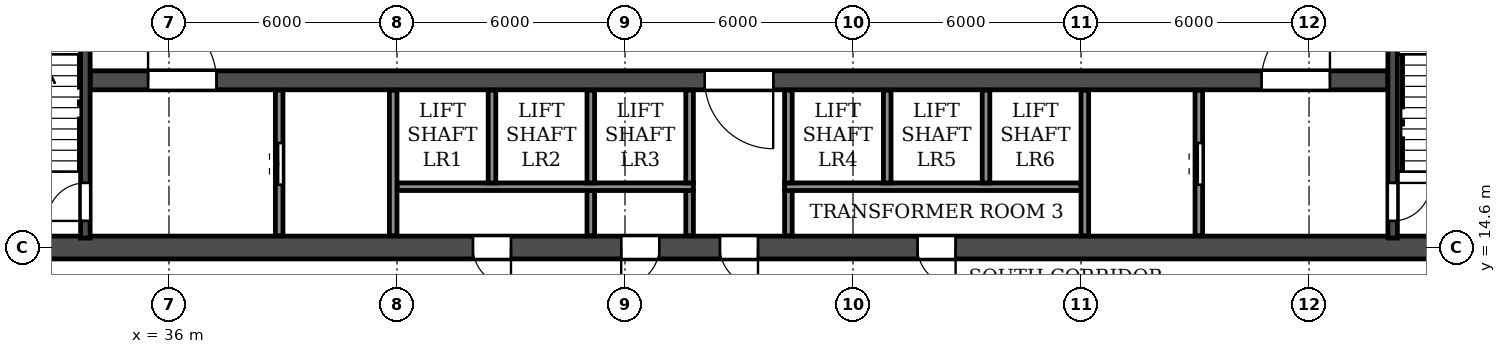
"""IFC4 building model, lengths in metres.
Left out: names, types, materials, properties, quantities, classifications, styles, units other than length and angle.
Written with IfcOpenShell. Run it as: python <this file> out.ifc"""

import sys

from ifc_helpers import new_model, si_unit, direction, frame, frame_2d, origin, place, context, subcontext, project, spatial, rectangle, extrude, element, fill, save


model = new_model("IFC4")
c1 = context("Model", 3, precision=1e-05, world=origin(), true_north=direction((0.0, 1.0)))
c2 = subcontext(c1, "Body", "Model", "MODEL_VIEW")
j1 = project(units=[si_unit("LENGTHUNIT", "METRE"), si_unit("PLANEANGLEUNIT", "RADIAN")], contexts=[c1])
p1 = place(None, origin())
s1 = spatial("IfcSite", under=j1, at=p1, CompositionType="ELEMENT")
p2 = place(p1, origin())
s2 = spatial("IfcBuilding", under=s1, at=p2, CompositionType="ELEMENT")
p3 = place(p2, frame((0.0, 0.0, 115.8)))
s3 = spatial("IfcBuildingStorey", under=s2, at=p3, CompositionType="ELEMENT", Elevation=115.8)
p4 = place(p3, frame((29.7, 14.6, 0.0), z_axis=(0.0, 0.0, 1.0), x_axis=(1.0, 0.0, 0.0)))
e1 = element("IfcWall", 1, at=p4, inside=s3, PredefinedType="SOLIDWALL", context=c2, shape_type="SweptSolid", body=[
    extrude(rectangle(XDim=42.6, YDim=0.6, at=frame_2d((21.3, 0.0))), origin(), (0.0, 0.0, 1.0), 6.37),
])
p5 = place(p4, frame((1.7, 0.0, 0.0)))
e2 = element("IfcOpeningElement", 2, at=p5, cuts=e1, PredefinedType="OPENING", context=c2, shape_type="SweptSolid", body=[
    extrude(rectangle(XDim=1.0, YDim=2.1, at=frame_2d((0.5, 1.05))), frame((0.0, 0.31, 0.0), z_axis=(0.0, -1.0, 0.0), x_axis=(1.0, 0.0, 0.0)), (0.0, 0.0, 1.0), 0.62),
])
p6 = place(p4, frame((14.3, 0.0, 0.0)))
e3 = element("IfcOpeningElement", 3, at=p6, cuts=e1, PredefinedType="OPENING", context=c2, shape_type="SweptSolid", body=[
    extrude(rectangle(XDim=1.0, YDim=2.1, at=frame_2d((0.5, 1.05))), frame((0.0, 0.31, 0.0), z_axis=(0.0, -1.0, 0.0), x_axis=(1.0, 0.0, 0.0)), (0.0, 0.0, 1.0), 0.62),
])
p7 = place(p4, frame((18.2, 0.0, 0.0)))
e4 = element("IfcOpeningElement", 4, at=p7, cuts=e1, PredefinedType="OPENING", context=c2, shape_type="SweptSolid", body=[
    extrude(rectangle(XDim=1.0, YDim=2.1, at=frame_2d((0.5, 1.05))), frame((0.0, 0.31, 0.0), z_axis=(0.0, -1.0, 0.0), x_axis=(1.0, 0.0, 0.0)), (0.0, 0.0, 1.0), 0.62),
])
p8 = place(p4, frame((20.8, 0.0, 0.0)))
e5 = element("IfcOpeningElement", 5, at=p8, cuts=e1, PredefinedType="OPENING", context=c2, shape_type="SweptSolid", body=[
    extrude(rectangle(XDim=1.0, YDim=2.1, at=frame_2d((0.5, 1.05))), frame((0.0, 0.31, 0.0), z_axis=(0.0, -1.0, 0.0), x_axis=(1.0, 0.0, 0.0)), (0.0, 0.0, 1.0), 0.62),
])
p9 = place(p4, frame((26.0, 0.0, 0.0)))
e6 = element("IfcOpeningElement", 6, at=p9, cuts=e1, PredefinedType="OPENING", context=c2, shape_type="SweptSolid", body=[
    extrude(rectangle(XDim=1.0, YDim=2.1, at=frame_2d((0.5, 1.05))), frame((0.0, 0.31, 0.0), z_axis=(0.0, -1.0, 0.0), x_axis=(1.0, 0.0, 0.0)), (0.0, 0.0, 1.0), 0.62),
])
p10 = place(p4, frame((39.9, 0.0, 0.0)))
e7 = element("IfcOpeningElement", 7, at=p10, cuts=e1, PredefinedType="OPENING", context=c2, shape_type="SweptSolid", body=[
    extrude(rectangle(XDim=1.0, YDim=2.1, at=frame_2d((0.5, 1.05))), frame((0.0, 0.31, 0.0), z_axis=(0.0, -1.0, 0.0), x_axis=(1.0, 0.0, 0.0)), (0.0, 0.0, 1.0), 0.62),
])
p11 = place(p3, frame((33.925, 19.0, 0.0), z_axis=(0.0, 0.0, 1.0), x_axis=(1.0, 0.0, 0.0)))
e8 = element("IfcWall", 8, at=p11, inside=s3, PredefinedType="SOLIDWALL", context=c2, shape_type="SweptSolid", body=[
    extrude(rectangle(XDim=34.15, YDim=0.5, at=frame_2d((17.075, 0.0))), origin(), (0.0, 0.0, 1.0), 6.37),
])
p12 = place(p11, frame((16.175, 0.0, 0.0)))
e9 = element("IfcOpeningElement", 9, at=p12, cuts=e8, PredefinedType="OPENING", context=c2, shape_type="SweptSolid", body=[
    extrude(rectangle(XDim=1.8, YDim=2.1, at=frame_2d((0.9, 1.05))), frame((0.0, 0.26, 0.0), z_axis=(0.0, -1.0, 0.0), x_axis=(1.0, 0.0, 0.0)), (0.0, 0.0, 1.0), 0.52),
])
p13 = place(p11, frame((1.525, 0.0, 0.0)))
e10 = element("IfcOpeningElement", 10, at=p13, cuts=e8, PredefinedType="OPENING", context=c2, shape_type="SweptSolid", body=[
    extrude(rectangle(XDim=1.8, YDim=2.1, at=frame_2d((0.9, 1.05))), frame((0.0, 0.26, 0.0), z_axis=(0.0, -1.0, 0.0), x_axis=(1.0, 0.0, 0.0)), (0.0, 0.0, 1.0), 0.52),
])
p14 = place(p11, frame((30.825, 0.0, 0.0)))
e11 = element("IfcOpeningElement", 11, at=p14, cuts=e8, PredefinedType="OPENING", context=c2, shape_type="SweptSolid", body=[
    extrude(rectangle(XDim=1.8, YDim=2.1, at=frame_2d((0.9, 1.05))), frame((0.0, 0.26, 0.0), z_axis=(0.0, -1.0, 0.0), x_axis=(1.0, 0.0, 0.0)), (0.0, 0.0, 1.0), 0.52),
])
p15 = place(p3, frame((33.8, 14.85, 0.0), z_axis=(0.0, 0.0, 1.0), x_axis=(0.0, 1.0, 0.0)))
e12 = element("IfcWall", 12, at=p15, inside=s3, PredefinedType="SOLIDWALL", context=c2, shape_type="SweptSolid", body=[
    extrude(rectangle(XDim=7.625, YDim=0.25, at=frame_2d((3.812, 0.0))), origin(), (0.0, 0.0, 1.0), 6.37),
])
p16 = place(p15, frame((0.45, 0.0, 0.0)))
e13 = element("IfcOpeningElement", 13, at=p16, cuts=e12, PredefinedType="OPENING", context=c2, shape_type="SweptSolid", body=[
    extrude(rectangle(XDim=1.0, YDim=2.1, at=frame_2d((0.5, 1.05))), frame((0.0, 0.135, 0.0), z_axis=(0.0, -1.0, 0.0), x_axis=(1.0, 0.0, 0.0)), (0.0, 0.0, 1.0), 0.27),
])
p17 = place(p3, frame((68.2, 14.85, 0.0), z_axis=(0.0, 0.0, 1.0), x_axis=(0.0, 1.0, 0.0)))
e14 = element("IfcWall", 14, at=p17, inside=s3, PredefinedType="SOLIDWALL", context=c2, shape_type="SweptSolid", body=[
    extrude(rectangle(XDim=7.625, YDim=0.25, at=frame_2d((3.812, 0.0))), origin(), (0.0, 0.0, 1.0), 6.37),
])
p18 = place(p17, frame((0.45, 0.0, 0.0)))
e15 = element("IfcOpeningElement", 15, at=p18, cuts=e14, PredefinedType="OPENING", context=c2, shape_type="SweptSolid", body=[
    extrude(rectangle(XDim=1.0, YDim=2.1, at=frame_2d((0.5, 1.05))), frame((0.0, 0.135, 0.0), z_axis=(0.0, -1.0, 0.0), x_axis=(1.0, 0.0, 0.0)), (0.0, 0.0, 1.0), 0.27),
])
for number, where, z_axis, x_axis in (
    (16, (47.1, 14.91, 0.0), (0.0, 0.0, 1.0), (0.0, 1.0, 0.0)),
    (17, (49.7, 14.91, 0.0), (0.0, 0.0, 1.0), (0.0, 1.0, 0.0)),
    (18, (52.3, 14.91, 0.0), (0.0, 0.0, 1.0), (0.0, 1.0, 0.0)),
):
    element("IfcWall", number, at=place(p3, frame(where, z_axis=z_axis, x_axis=x_axis)), inside=s3, PredefinedType="PARTITIONING", context=c2, shape_type="SweptSolid", body=[
        extrude(rectangle(XDim=1.19, YDim=0.2, at=frame_2d((0.595, 0.0))), origin(), (0.0, 0.0, 1.0), 6.37),
    ])
for number, where, z_axis, x_axis in (
    (19, (42.0, 16.2, 0.0), (0.0, 0.0, 1.0), (1.0, 0.0, 0.0)),
    (20, (52.2, 16.2, 0.0), (0.0, 0.0, 1.0), (1.0, 0.0, 0.0)),
):
    element("IfcWall", number, at=place(p3, frame(where, z_axis=z_axis, x_axis=x_axis)), inside=s3, PredefinedType="PARTITIONING", context=c2, shape_type="SweptSolid", body=[
        extrude(rectangle(XDim=7.8, YDim=0.2, at=frame_2d((3.9, 0.0))), origin(), (0.0, 0.0, 1.0), 6.37),
    ])
p19 = place(p3, frame((38.9, 14.91, 0.0), z_axis=(0.0, 0.0, 1.0), x_axis=(0.0, 1.0, 0.0)))
e21 = element("IfcWall", 21, at=p19, inside=s3, PredefinedType="PARTITIONING", context=c2, shape_type="SweptSolid", body=[
    extrude(rectangle(XDim=3.83, YDim=0.2, at=frame_2d((1.915, 0.0))), origin(), (0.0, 0.0, 1.0), 6.37),
])
p20 = place(p19, frame((1.34, 0.0, 0.0)))
e22 = element("IfcOpeningElement", 22, at=p20, cuts=e21, PredefinedType="OPENING", context=c2, shape_type="SweptSolid", body=[
    extrude(rectangle(XDim=1.1, YDim=2.1, at=frame_2d((0.55, 1.05))), frame((0.0, 0.11, 0.0), z_axis=(0.0, -1.0, 0.0), x_axis=(1.0, 0.0, 0.0)), (0.0, 0.0, 1.0), 0.22),
])
p21 = place(p3, frame((41.9, 14.91, 0.0), z_axis=(0.0, 0.0, 1.0), x_axis=(0.0, 1.0, 0.0)))
e23 = element("IfcWall", 23, at=p21, inside=s3, PredefinedType="PARTITIONING", context=c2, shape_type="SweptSolid", body=[
    extrude(rectangle(XDim=3.83, YDim=0.2, at=frame_2d((1.915, 0.0))), origin(), (0.0, 0.0, 1.0), 6.37),
])
for number, where, z_axis, x_axis in (
    (24, (44.5, 16.3, 0.0), (0.0, 0.0, 1.0), (0.0, 1.0, 0.0)),
    (25, (47.1, 16.3, 0.0), (0.0, 0.0, 1.0), (0.0, 1.0, 0.0)),
    (26, (49.7, 16.3, 0.0), (0.0, 0.0, 1.0), (0.0, 1.0, 0.0)),
    (27, (52.3, 16.3, 0.0), (0.0, 0.0, 1.0), (0.0, 1.0, 0.0)),
    (28, (54.9, 16.3, 0.0), (0.0, 0.0, 1.0), (0.0, 1.0, 0.0)),
    (29, (57.5, 16.3, 0.0), (0.0, 0.0, 1.0), (0.0, 1.0, 0.0)),
):
    element("IfcWall", number, at=place(p3, frame(where, z_axis=z_axis, x_axis=x_axis)), inside=s3, PredefinedType="PARTITIONING", context=c2, shape_type="SweptSolid", body=[
        extrude(rectangle(XDim=2.44, YDim=0.2, at=frame_2d((1.22, 0.0))), origin(), (0.0, 0.0, 1.0), 6.37),
    ])
p22 = place(p3, frame((60.1, 14.91, 0.0), z_axis=(0.0, 0.0, 1.0), x_axis=(0.0, 1.0, 0.0)))
e30 = element("IfcWall", 30, at=p22, inside=s3, PredefinedType="PARTITIONING", context=c2, shape_type="SweptSolid", body=[
    extrude(rectangle(XDim=3.83, YDim=0.2, at=frame_2d((1.915, 0.0))), origin(), (0.0, 0.0, 1.0), 6.37),
])
p23 = place(p3, frame((63.1, 14.91, 0.0), z_axis=(0.0, 0.0, 1.0), x_axis=(0.0, 1.0, 0.0)))
e31 = element("IfcWall", 31, at=p23, inside=s3, PredefinedType="PARTITIONING", context=c2, shape_type="SweptSolid", body=[
    extrude(rectangle(XDim=3.83, YDim=0.2, at=frame_2d((1.915, 0.0))), origin(), (0.0, 0.0, 1.0), 6.37),
])
p24 = place(p23, frame((1.34, 0.0, 0.0)))
e32 = element("IfcOpeningElement", 32, at=p24, cuts=e31, PredefinedType="OPENING", context=c2, shape_type="SweptSolid", body=[
    extrude(rectangle(XDim=1.1, YDim=2.1, at=frame_2d((0.55, 1.05))), frame((0.0, 0.11, 0.0), z_axis=(0.0, -1.0, 0.0), x_axis=(1.0, 0.0, 0.0)), (0.0, 0.0, 1.0), 0.22),
])
p25 = place(p6, frame((1.0, 0.0, 0.0), z_axis=(0.0, 0.0, 1.0), x_axis=(-1.0, 0.0, 0.0)))
e33 = element("IfcDoor", 33, at=p25, inside=s3, OperationType="SINGLE_SWING_LEFT", PredefinedType="DOOR", context=c2, shape_type="SweptSolid", body=[
    extrude(rectangle(XDim=1.0, YDim=2.1, at=frame_2d((0.5, 1.05))), frame((0.0, 0.025, 0.0), z_axis=(0.0, -1.0, 0.0), x_axis=(1.0, 0.0, 0.0)), (0.0, 0.0, 1.0), 0.05),
])
fill(e3, e33)
p26 = place(p7, frame((1.0, 0.0, 0.0), z_axis=(0.0, 0.0, 1.0), x_axis=(-1.0, 0.0, 0.0)))
e34 = element("IfcDoor", 34, at=p26, inside=s3, OperationType="SINGLE_SWING_RIGHT", PredefinedType="DOOR", context=c2, shape_type="SweptSolid", body=[
    extrude(rectangle(XDim=1.0, YDim=2.1, at=frame_2d((0.5, 1.05))), frame((0.0, 0.025, 0.0), z_axis=(0.0, -1.0, 0.0), x_axis=(1.0, 0.0, 0.0)), (0.0, 0.0, 1.0), 0.05),
])
fill(e4, e34)
p27 = place(p8, frame((1.0, 0.0, 0.0), z_axis=(0.0, 0.0, 1.0), x_axis=(-1.0, 0.0, 0.0)))
e35 = element("IfcDoor", 35, at=p27, inside=s3, OperationType="SINGLE_SWING_LEFT", PredefinedType="DOOR", context=c2, shape_type="SweptSolid", body=[
    extrude(rectangle(XDim=1.0, YDim=2.1, at=frame_2d((0.5, 1.05))), frame((0.0, 0.025, 0.0), z_axis=(0.0, -1.0, 0.0), x_axis=(1.0, 0.0, 0.0)), (0.0, 0.0, 1.0), 0.05),
])
fill(e5, e35)
p28 = place(p9, frame((1.0, 0.0, 0.0), z_axis=(0.0, 0.0, 1.0), x_axis=(-1.0, 0.0, 0.0)))
e36 = element("IfcDoor", 36, at=p28, inside=s3, OperationType="SINGLE_SWING_LEFT", PredefinedType="DOOR", context=c2, shape_type="SweptSolid", body=[
    extrude(rectangle(XDim=1.0, YDim=2.1, at=frame_2d((0.5, 1.05))), frame((0.0, 0.025, 0.0), z_axis=(0.0, -1.0, 0.0), x_axis=(1.0, 0.0, 0.0)), (0.0, 0.0, 1.0), 0.05),
])
fill(e6, e36)
p29 = place(p24, origin())
e37 = element("IfcDoor", 37, at=p29, inside=s3, OperationType="DOUBLE_DOOR_SLIDING", PredefinedType="DOOR", context=c2, shape_type="SweptSolid", body=[
    extrude(rectangle(XDim=1.1, YDim=2.1, at=frame_2d((0.55, 1.05))), frame((0.0, 0.025, 0.0), z_axis=(0.0, -1.0, 0.0), x_axis=(1.0, 0.0, 0.0)), (0.0, 0.0, 1.0), 0.05),
])
fill(e32, e37)
p30 = place(p18, frame((1.0, 0.0, 0.0), z_axis=(0.0, 0.0, 1.0), x_axis=(-1.0, 0.0, 0.0)))
e38 = element("IfcDoor", 38, at=p30, inside=s3, OperationType="SINGLE_SWING_LEFT", PredefinedType="DOOR", context=c2, shape_type="SweptSolid", body=[
    extrude(rectangle(XDim=1.0, YDim=2.1, at=frame_2d((0.5, 1.05))), frame((0.0, 0.025, 0.0), z_axis=(0.0, -1.0, 0.0), x_axis=(1.0, 0.0, 0.0)), (0.0, 0.0, 1.0), 0.05),
])
fill(e15, e38)
p31 = place(p16, origin())
e39 = element("IfcDoor", 39, at=p31, inside=s3, OperationType="SINGLE_SWING_LEFT", PredefinedType="DOOR", context=c2, shape_type="SweptSolid", body=[
    extrude(rectangle(XDim=1.0, YDim=2.1, at=frame_2d((0.5, 1.05))), frame((0.0, 0.025, 0.0), z_axis=(0.0, -1.0, 0.0), x_axis=(1.0, 0.0, 0.0)), (0.0, 0.0, 1.0), 0.05),
])
fill(e13, e39)
p32 = place(p20, origin())
e40 = element("IfcDoor", 40, at=p32, inside=s3, OperationType="DOUBLE_DOOR_SLIDING", PredefinedType="DOOR", context=c2, shape_type="SweptSolid", body=[
    extrude(rectangle(XDim=1.1, YDim=2.1, at=frame_2d((0.55, 1.05))), frame((0.0, 0.025, 0.0), z_axis=(0.0, -1.0, 0.0), x_axis=(1.0, 0.0, 0.0)), (0.0, 0.0, 1.0), 0.05),
])
fill(e22, e40)
p33 = place(p12, frame((1.8, 0.0, 0.0), z_axis=(0.0, 0.0, 1.0), x_axis=(-1.0, 0.0, 0.0)))
e41 = element("IfcDoor", 41, at=p33, inside=s3, OperationType="DOUBLE_DOOR_SINGLE_SWING", PredefinedType="DOOR", context=c2, shape_type="SweptSolid", body=[
    extrude(rectangle(XDim=1.8, YDim=2.1, at=frame_2d((0.9, 1.05))), frame((0.0, 0.025, 0.0), z_axis=(0.0, -1.0, 0.0), x_axis=(1.0, 0.0, 0.0)), (0.0, 0.0, 1.0), 0.05),
])
fill(e9, e41)
p34 = place(p13, origin())
e42 = element("IfcDoor", 42, at=p34, inside=s3, OperationType="DOUBLE_DOOR_SINGLE_SWING", PredefinedType="DOOR", context=c2, shape_type="SweptSolid", body=[
    extrude(rectangle(XDim=1.8, YDim=2.1, at=frame_2d((0.9, 1.05))), frame((0.0, 0.025, 0.0), z_axis=(0.0, -1.0, 0.0), x_axis=(1.0, 0.0, 0.0)), (0.0, 0.0, 1.0), 0.05),
])
fill(e10, e42)
p35 = place(p14, origin())
e43 = element("IfcDoor", 43, at=p35, inside=s3, OperationType="DOUBLE_DOOR_SINGLE_SWING", PredefinedType="DOOR", context=c2, shape_type="SweptSolid", body=[
    extrude(rectangle(XDim=1.8, YDim=2.1, at=frame_2d((0.9, 1.05))), frame((0.0, 0.025, 0.0), z_axis=(0.0, -1.0, 0.0), x_axis=(1.0, 0.0, 0.0)), (0.0, 0.0, 1.0), 0.05),
])
fill(e11, e43)
save(model, sys.argv[1])
